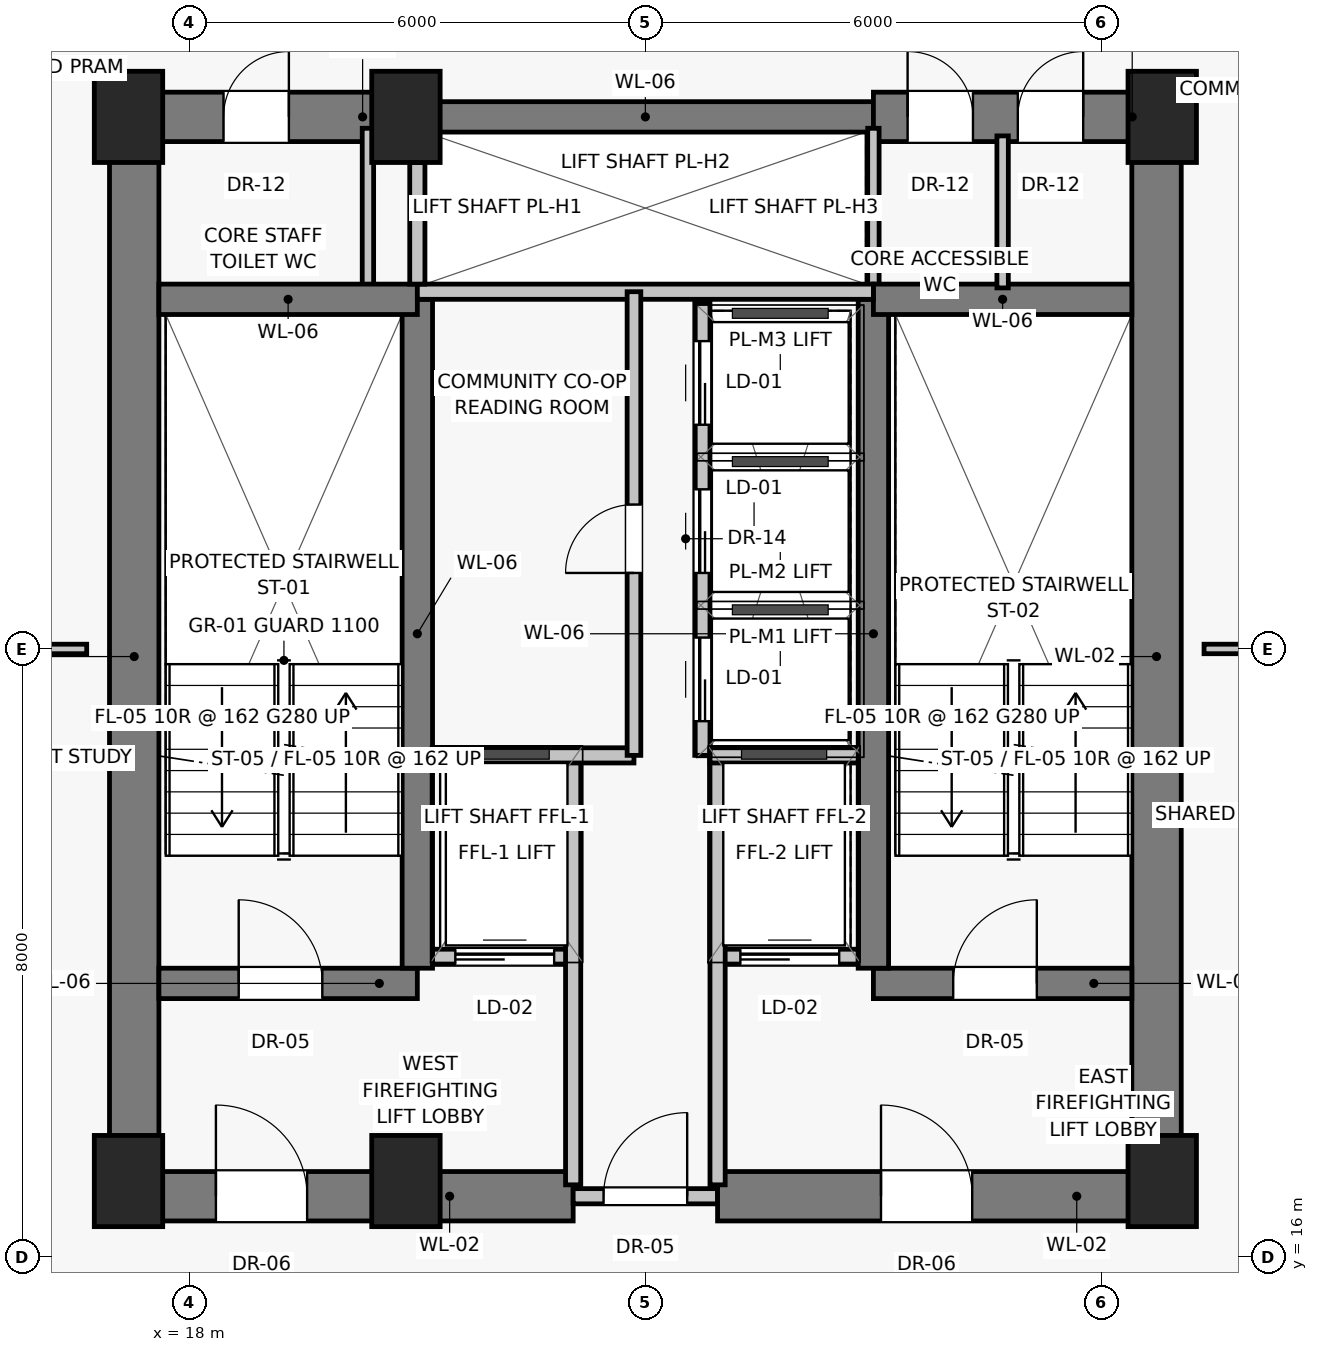
"""IFC4 building model, lengths in metres.
Left out: names, types, materials, properties, quantities, classifications, styles, units other than length and angle.
Written with IfcOpenShell. Run it as: python <this file> out.ifc"""

import sys

from ifc_helpers import new_model, si_unit, direction, frame, frame_2d, origin, origin_2d, place, context, subcontext, project, spatial, rectangle, extrude, source, transform, mapped, element, fill, save


model = new_model("IFC4")
c1 = context("Model", 3, precision=1e-05, world=origin(), true_north=direction((0.0, 1.0)))
c2 = subcontext(c1, "Body", "Model", "MODEL_VIEW")
j1 = project(units=[si_unit("LENGTHUNIT", "METRE"), si_unit("PLANEANGLEUNIT", "RADIAN")], contexts=[c1])
p1 = place(None, origin())
s1 = spatial("IfcSite", under=j1, at=p1, CompositionType="ELEMENT")
p2 = place(p1, origin())
s2 = spatial("IfcBuilding", under=s1, at=p2, CompositionType="ELEMENT")
p3 = place(p2, frame((0.0, 0.0, 149.0)))
s3 = spatial("IfcBuildingStorey", under=s2, at=p3, CompositionType="ELEMENT", Elevation=149.0)
for number, where, z_axis, x_axis in (
    (1, (17.2, 17.0, 0.0), (0.0, 0.0, 1.0), (1.0, 0.0, 0.0)),
    (2, (20.85, 17.0, 0.0), (0.0, 0.0, 1.0), (1.0, 0.0, 0.0)),
    (3, (30.8, 17.0, 0.0), (0.0, 0.0, 1.0), (1.0, 0.0, 0.0)),
    (4, (17.2, 31.0, 0.0), (0.0, 0.0, 1.0), (1.0, 0.0, 0.0)),
    (5, (20.85, 31.0, 0.0), (0.0, 0.0, 1.0), (1.0, 0.0, 0.0)),
    (6, (30.8, 31.0, 0.0), (0.0, 0.0, 1.0), (1.0, 0.0, 0.0)),
):
    element("IfcColumn", number, at=place(p3, frame(where, z_axis=z_axis, x_axis=x_axis)), inside=s3, PredefinedType="PILASTER", context=c2, shape_type="SweptSolid", body=[
        extrude(rectangle(XDim=0.9, YDim=1.2, at=origin_2d()), origin(), (0.0, 0.0, 1.0), 3.25),
    ])
for number, where, z_axis, x_axis in (
    (7, (17.275, 16.8, 0.0), (0.0, 0.0, 1.0), (0.0, 1.0, 0.0)),
    (8, (30.725, 16.8, 0.0), (0.0, 0.0, 1.0), (0.0, 1.0, 0.0)),
):
    element("IfcWall", number, at=place(p3, frame(where, z_axis=z_axis, x_axis=x_axis)), inside=s3, PredefinedType="SHEAR", context=c2, shape_type="SweptSolid", body=[
        extrude(rectangle(XDim=14.2, YDim=0.65, at=frame_2d((7.1, 0.0))), origin(), (0.0, 0.0, 1.0), 3.0),
    ])
p4 = place(p3, frame((17.2, 16.8, 0.0), z_axis=(0.0, 0.0, 1.0), x_axis=(1.0, 0.0, 0.0)))
e9 = element("IfcWall", 9, at=p4, inside=s3, PredefinedType="SHEAR", context=c2, shape_type="SweptSolid", body=[
    extrude(rectangle(XDim=5.85, YDim=0.65, at=frame_2d((2.925, 0.0))), origin(), (0.0, 0.0, 1.0), 3.0),
])
p5 = place(p4, frame((1.15, 0.0, 0.0)))
e10 = element("IfcOpeningElement", 10, at=p5, cuts=e9, PredefinedType="OPENING", context=c2, shape_type="SweptSolid", body=[
    extrude(rectangle(XDim=1.2, YDim=2.03, at=frame_2d((0.6, 1.015))), frame((0.0, 0.335, 0.0), z_axis=(0.0, -1.0, 0.0), x_axis=(1.0, 0.0, 0.0)), (0.0, 0.0, 1.0), 0.67),
])
p6 = place(p3, frame((23.05, 16.8, 0.0), z_axis=(0.0, 0.0, 1.0), x_axis=(1.0, 0.0, 0.0)))
e11 = element("IfcWall", 11, at=p6, inside=s3, PredefinedType="SOLIDWALL", context=c2, shape_type="SweptSolid", body=[
    extrude(rectangle(XDim=1.9, YDim=0.2, at=frame_2d((0.95, 0.0))), origin(), (0.0, 0.0, 1.0), 2.15),
])
p7 = place(p6, frame((0.4, 0.0, 0.0)))
e12 = element("IfcOpeningElement", 12, at=p7, cuts=e11, PredefinedType="OPENING", context=c2, shape_type="SweptSolid", body=[
    extrude(rectangle(XDim=1.1, YDim=2.03, at=frame_2d((0.55, 1.015))), frame((0.0, 0.11, 0.0), z_axis=(0.0, -1.0, 0.0), x_axis=(1.0, 0.0, 0.0)), (0.0, 0.0, 1.0), 0.22),
])
p8 = place(p3, frame((24.95, 16.8, 0.0), z_axis=(0.0, 0.0, 1.0), x_axis=(1.0, 0.0, 0.0)))
e13 = element("IfcWall", 13, at=p8, inside=s3, PredefinedType="SHEAR", context=c2, shape_type="SweptSolid", body=[
    extrude(rectangle(XDim=5.85, YDim=0.65, at=frame_2d((2.925, 0.0))), origin(), (0.0, 0.0, 1.0), 3.0),
])
p9 = place(p8, frame((2.15, 0.0, 0.0)))
e14 = element("IfcOpeningElement", 14, at=p9, cuts=e13, PredefinedType="OPENING", context=c2, shape_type="SweptSolid", body=[
    extrude(rectangle(XDim=1.2, YDim=2.03, at=frame_2d((0.6, 1.015))), frame((0.0, 0.335, 0.0), z_axis=(0.0, -1.0, 0.0), x_axis=(1.0, 0.0, 0.0)), (0.0, 0.0, 1.0), 0.67),
])
p10 = place(p3, frame((17.2, 31.0, 0.0), z_axis=(0.0, 0.0, 1.0), x_axis=(1.0, 0.0, 0.0)))
e15 = element("IfcWall", 15, at=p10, inside=s3, PredefinedType="SHEAR", context=c2, shape_type="SweptSolid", body=[
    extrude(rectangle(XDim=3.8, YDim=0.65, at=frame_2d((1.9, 0.0))), origin(), (0.0, 0.0, 1.0), 3.0),
])
p11 = place(p10, frame((1.25, 0.0, 0.0)))
e16 = element("IfcOpeningElement", 16, at=p11, cuts=e15, PredefinedType="OPENING", context=c2, shape_type="SweptSolid", body=[
    extrude(rectangle(XDim=0.86, YDim=2.01, at=frame_2d((0.43, 1.005))), frame((0.0, 0.335, 0.0), z_axis=(0.0, -1.0, 0.0), x_axis=(1.0, 0.0, 0.0)), (0.0, 0.0, 1.0), 0.67),
])
p12 = place(p3, frame((21.0, 31.0, 0.0), z_axis=(0.0, 0.0, 1.0), x_axis=(1.0, 0.0, 0.0)))
e17 = element("IfcWall", 17, at=p12, inside=s3, PredefinedType="SHEAR", context=c2, shape_type="SweptSolid", body=[
    extrude(rectangle(XDim=6.0, YDim=0.4, at=frame_2d((3.0, 0.0))), origin(), (0.0, 0.0, 1.0), 3.0),
])
p13 = place(p3, frame((27.0, 31.0, 0.0), z_axis=(0.0, 0.0, 1.0), x_axis=(1.0, 0.0, 0.0)))
e18 = element("IfcWall", 18, at=p13, inside=s3, PredefinedType="SHEAR", context=c2, shape_type="SweptSolid", body=[
    extrude(rectangle(XDim=3.8, YDim=0.65, at=frame_2d((1.9, 0.0))), origin(), (0.0, 0.0, 1.0), 3.0),
])
p14 = place(p13, frame((0.45, 0.0, 0.0)))
e19 = element("IfcOpeningElement", 19, at=p14, cuts=e18, PredefinedType="OPENING", context=c2, shape_type="SweptSolid", body=[
    extrude(rectangle(XDim=0.86, YDim=2.01, at=frame_2d((0.43, 1.005))), frame((0.0, 0.335, 0.0), z_axis=(0.0, -1.0, 0.0), x_axis=(1.0, 0.0, 0.0)), (0.0, 0.0, 1.0), 0.67),
])
p15 = place(p13, frame((1.9, 0.0, 0.0)))
e20 = element("IfcOpeningElement", 20, at=p15, cuts=e18, PredefinedType="OPENING", context=c2, shape_type="SweptSolid", body=[
    extrude(rectangle(XDim=0.86, YDim=2.01, at=frame_2d((0.43, 1.005))), frame((0.0, 0.335, 0.0), z_axis=(0.0, -1.0, 0.0), x_axis=(1.0, 0.0, 0.0)), (0.0, 0.0, 1.0), 0.67),
])
for number, where, z_axis, x_axis in (
    (21, (20.35, 28.65, 0.0), (0.0, 0.0, 1.0), (0.0, 1.0, 0.0)),
    (22, (27.0, 28.65, 0.0), (0.0, 0.0, 1.0), (0.0, 1.0, 0.0)),
):
    element("IfcWall", number, at=place(p3, frame(where, z_axis=z_axis, x_axis=x_axis)), inside=s3, PredefinedType="PARTITIONING", context=c2, shape_type="SweptSolid", body=[
        extrude(rectangle(XDim=2.2, YDim=0.15, at=frame_2d((1.1, 0.0))), origin(), (0.0, 0.0, 1.0), 3.0),
    ])
p16 = place(p3, frame((17.6, 19.6, 0.0), z_axis=(0.0, 0.0, 1.0), x_axis=(1.0, 0.0, 0.0)))
e23 = element("IfcWall", 23, at=p16, inside=s3, PredefinedType="SHEAR", context=c2, shape_type="SweptSolid", body=[
    extrude(rectangle(XDim=3.4, YDim=0.4, at=frame_2d((1.7, 0.0))), origin(), (0.0, 0.0, 1.0), 3.0),
])
p17 = place(p16, frame((1.05, 0.0, 0.0)))
e24 = element("IfcOpeningElement", 24, at=p17, cuts=e23, PredefinedType="OPENING", context=c2, shape_type="SweptSolid", body=[
    extrude(rectangle(XDim=1.1, YDim=2.03, at=frame_2d((0.55, 1.015))), frame((0.0, 0.21, 0.0), z_axis=(0.0, -1.0, 0.0), x_axis=(1.0, 0.0, 0.0)), (0.0, 0.0, 1.0), 0.42),
])
p18 = place(p3, frame((21.2, 19.95, 0.0), z_axis=(0.0, 0.0, 1.0), x_axis=(1.0, 0.0, 0.0)))
e25 = element("IfcWall", 25, at=p18, inside=s3, PredefinedType="SOLIDWALL", context=c2, shape_type="SweptSolid", body=[
    extrude(rectangle(XDim=1.85, YDim=0.2, at=frame_2d((0.925, 0.0))), origin(), (0.0, 0.0, 1.0), 3.0),
])
p19 = place(p18, frame((0.3, 0.0, 0.0)))
e26 = element("IfcOpeningElement", 26, at=p19, cuts=e25, PredefinedType="OPENING", context=c2, shape_type="SweptSolid", body=[
    extrude(rectangle(XDim=1.3, YDim=2.25, at=frame_2d((0.65, 1.125))), frame((0.0, 0.11, 0.0), z_axis=(0.0, -1.0, 0.0), x_axis=(1.0, 0.0, 0.0)), (0.0, 0.0, 1.0), 0.22),
])
p20 = place(p3, frame((24.95, 19.95, 0.0), z_axis=(0.0, 0.0, 1.0), x_axis=(1.0, 0.0, 0.0)))
e27 = element("IfcWall", 27, at=p20, inside=s3, PredefinedType="SOLIDWALL", context=c2, shape_type="SweptSolid", body=[
    extrude(rectangle(XDim=1.85, YDim=0.2, at=frame_2d((0.925, 0.0))), origin(), (0.0, 0.0, 1.0), 3.0),
])
p21 = place(p20, frame((0.3, 0.0, 0.0)))
e28 = element("IfcOpeningElement", 28, at=p21, cuts=e27, PredefinedType="OPENING", context=c2, shape_type="SweptSolid", body=[
    extrude(rectangle(XDim=1.3, YDim=2.25, at=frame_2d((0.65, 1.125))), frame((0.0, 0.11, 0.0), z_axis=(0.0, -1.0, 0.0), x_axis=(1.0, 0.0, 0.0)), (0.0, 0.0, 1.0), 0.22),
])
p22 = place(p3, frame((27.0, 19.6, 0.0), z_axis=(0.0, 0.0, 1.0), x_axis=(1.0, 0.0, 0.0)))
e29 = element("IfcWall", 29, at=p22, inside=s3, PredefinedType="SHEAR", context=c2, shape_type="SweptSolid", body=[
    extrude(rectangle(XDim=3.4, YDim=0.4, at=frame_2d((1.7, 0.0))), origin(), (0.0, 0.0, 1.0), 3.0),
])
p23 = place(p22, frame((1.05, 0.0, 0.0)))
e30 = element("IfcOpeningElement", 30, at=p23, cuts=e29, PredefinedType="OPENING", context=c2, shape_type="SweptSolid", body=[
    extrude(rectangle(XDim=1.1, YDim=2.03, at=frame_2d((0.55, 1.015))), frame((0.0, 0.21, 0.0), z_axis=(0.0, -1.0, 0.0), x_axis=(1.0, 0.0, 0.0)), (0.0, 0.0, 1.0), 0.42),
])
for number, where, z_axis, x_axis in (
    (31, (21.0, 19.8, 0.0), (0.0, 0.0, 1.0), (0.0, 1.0, 0.0)),
    (32, (27.0, 19.8, 0.0), (0.0, 0.0, 1.0), (0.0, 1.0, 0.0)),
):
    element("IfcWall", number, at=place(p3, frame(where, z_axis=z_axis, x_axis=x_axis)), inside=s3, PredefinedType="SHEAR", context=c2, shape_type="SweptSolid", body=[
        extrude(rectangle(XDim=8.8, YDim=0.4, at=frame_2d((4.4, 0.0))), origin(), (0.0, 0.0, 1.0), 3.0),
    ])
for number, where, z_axis, x_axis in (
    (33, (17.6, 28.6, 0.0), (0.0, 0.0, 1.0), (1.0, 0.0, 0.0)),
    (34, (27.0, 28.6, 0.0), (0.0, 0.0, 1.0), (1.0, 0.0, 0.0)),
):
    element("IfcWall", number, at=place(p3, frame(where, z_axis=z_axis, x_axis=x_axis)), inside=s3, PredefinedType="SHEAR", context=c2, shape_type="SweptSolid", body=[
        extrude(rectangle(XDim=3.4, YDim=0.4, at=frame_2d((1.7, 0.0))), origin(), (0.0, 0.0, 1.0), 3.0),
    ])
for number, where, z_axis, x_axis in (
    (35, (23.05, 16.95, 0.0), (0.0, 0.0, 1.0), (0.0, 1.0, 0.0)),
    (36, (24.95, 16.95, 0.0), (0.0, 0.0, 1.0), (0.0, 1.0, 0.0)),
):
    element("IfcWall", number, at=place(p3, frame(where, z_axis=z_axis, x_axis=x_axis)), inside=s3, PredefinedType="SOLIDWALL", context=c2, shape_type="SweptSolid", body=[
        extrude(rectangle(XDim=5.6, YDim=0.2, at=frame_2d((2.8, 0.0))), origin(), (0.0, 0.0, 1.0), 3.0),
    ])
p24 = place(p3, frame((21.2, 22.6, 0.0), z_axis=(0.0, 0.0, 1.0), x_axis=(1.0, 0.0, 0.0)))
e37 = element("IfcWall", 37, at=p24, inside=s3, PredefinedType="SOLIDWALL", context=c2, shape_type="SweptSolid", body=[
    extrude(rectangle(XDim=2.65, YDim=0.2, at=frame_2d((1.325, 0.0))), origin(), (0.0, 0.0, 1.0), 3.0),
])
p25 = place(p3, frame((24.85, 22.6, 0.0), z_axis=(0.0, 0.0, 1.0), x_axis=(1.0, 0.0, 0.0)))
e38 = element("IfcWall", 38, at=p25, inside=s3, PredefinedType="SOLIDWALL", context=c2, shape_type="SweptSolid", body=[
    extrude(rectangle(XDim=1.95, YDim=0.2, at=frame_2d((0.975, 0.0))), origin(), (0.0, 0.0, 1.0), 3.0),
])
p26 = place(p3, frame((21.0, 28.7, 0.0), z_axis=(0.0, 0.0, 1.0), x_axis=(1.0, 0.0, 0.0)))
e39 = element("IfcWall", 39, at=p26, inside=s3, PredefinedType="SOLIDWALL", context=c2, shape_type="SweptSolid", body=[
    extrude(rectangle(XDim=6.0, YDim=0.2, at=frame_2d((3.0, 0.0))), origin(), (0.0, 0.0, 1.0), 3.0),
])
p27 = place(p3, frame((21.0, 28.8, 0.0), z_axis=(0.0, 0.0, 1.0), x_axis=(0.0, 1.0, 0.0)))
e40 = element("IfcWall", 40, at=p27, inside=s3, PredefinedType="SOLIDWALL", context=c2, shape_type="SweptSolid", body=[
    extrude(rectangle(XDim=1.6, YDim=0.2, at=frame_2d((0.8, 0.0))), origin(), (0.0, 0.0, 1.0), 3.0),
])
p28 = place(p3, frame((23.85, 22.6, 0.0), z_axis=(0.0, 0.0, 1.0), x_axis=(0.0, 1.0, 0.0)))
e41 = element("IfcWall", 41, at=p28, inside=s3, PredefinedType="PARTITIONING", context=c2, shape_type="SweptSolid", body=[
    extrude(rectangle(XDim=6.1, YDim=0.18, at=frame_2d((3.05, 0.0))), origin(), (0.0, 0.0, 1.0), 3.0),
])
p29 = place(p28, frame((2.4, 0.0, 0.0)))
e42 = element("IfcOpeningElement", 42, at=p29, cuts=e41, PredefinedType="OPENING", context=c2, shape_type="SweptSolid", body=[
    extrude(rectangle(XDim=0.9, YDim=2.01, at=frame_2d((0.45, 1.005))), frame((0.0, 0.1, 0.0), z_axis=(0.0, -1.0, 0.0), x_axis=(1.0, 0.0, 0.0)), (0.0, 0.0, 1.0), 0.2),
])
p30 = place(p3, frame((24.75, 22.6, 0.0), z_axis=(0.0, 0.0, 1.0), x_axis=(0.0, 1.0, 0.0)))
e43 = element("IfcWall", 43, at=p30, inside=s3, PredefinedType="SOLIDWALL", context=c2, shape_type="SweptSolid", body=[
    extrude(rectangle(XDim=5.95, YDim=0.2, at=frame_2d((2.975, 0.0))), origin(), (0.0, 0.0, 1.0), 3.0),
])
p31 = place(p30, frame((0.45, 0.0, 0.0)))
e44 = element("IfcOpeningElement", 44, at=p31, cuts=e43, PredefinedType="OPENING", context=c2, shape_type="SweptSolid", body=[
    extrude(rectangle(XDim=1.1, YDim=2.08, at=frame_2d((0.55, 1.04))), frame((0.0, 0.11, 0.0), z_axis=(0.0, -1.0, 0.0), x_axis=(1.0, 0.0, 0.0)), (0.0, 0.0, 1.0), 0.22),
])
p32 = place(p30, frame((2.4, 0.0, 0.0)))
e45 = element("IfcOpeningElement", 45, at=p32, cuts=e43, PredefinedType="OPENING", context=c2, shape_type="SweptSolid", body=[
    extrude(rectangle(XDim=1.1, YDim=2.08, at=frame_2d((0.55, 1.04))), frame((0.0, 0.11, 0.0), z_axis=(0.0, -1.0, 0.0), x_axis=(1.0, 0.0, 0.0)), (0.0, 0.0, 1.0), 0.22),
])
p33 = place(p30, frame((4.35, 0.0, 0.0)))
e46 = element("IfcOpeningElement", 46, at=p33, cuts=e43, PredefinedType="OPENING", context=c2, shape_type="SweptSolid", body=[
    extrude(rectangle(XDim=1.1, YDim=2.08, at=frame_2d((0.55, 1.04))), frame((0.0, 0.11, 0.0), z_axis=(0.0, -1.0, 0.0), x_axis=(1.0, 0.0, 0.0)), (0.0, 0.0, 1.0), 0.22),
])
p34 = place(p3, frame((28.7, 28.75, 0.0), z_axis=(0.0, 0.0, 1.0), x_axis=(0.0, 1.0, 0.0)))
e47 = element("IfcWall", 47, at=p34, inside=s3, PredefinedType="PARTITIONING", context=c2, shape_type="SweptSolid", body=[
    extrude(rectangle(XDim=2.0, YDim=0.15, at=frame_2d((1.0, 0.0))), origin(), (0.0, 0.0, 1.0), 3.0),
])
for number, where, z_axis, x_axis in (
    (48, (14.55, 24.0, 0.0), (0.0, 0.0, 1.0), (1.0, 0.0, 0.0)),
    (49, (31.35, 24.0, 0.0), (0.0, 0.0, 1.0), (1.0, 0.0, 0.0)),
):
    element("IfcWall", number, at=place(p3, frame(where, z_axis=z_axis, x_axis=x_axis)), inside=s3, PredefinedType="PARTITIONING", context=c2, shape_type="SweptSolid", body=[
        extrude(rectangle(XDim=2.1, YDim=0.125, at=frame_2d((1.05, 0.0))), origin(), (0.0, 0.0, 1.0), 3.0),
    ])
m1 = source(origin(), c2, "Body", "SweptSolid", [
    extrude(rectangle(XDim=1.2, YDim=2.03, at=frame_2d((0.6, 1.015))), frame((0.0, 0.025, 0.0), z_axis=(0.0, -1.0, 0.0), x_axis=(1.0, 0.0, 0.0)), (0.0, 0.0, 1.0), 0.05),
])
p35 = place(p5, origin())
e50 = element("IfcDoor", 50, at=p35, inside=s3, OperationType="SINGLE_SWING_LEFT", PredefinedType="DOOR", context=c2, shape_type="MappedRepresentation", body=[
    mapped(m1, transform((0.0, 0.0, 0.0), scale=1.0)),
])
fill(e10, e50)
m2 = source(origin(), c2, "Body", "SweptSolid", [
    extrude(rectangle(XDim=1.1, YDim=2.03, at=frame_2d((0.55, 1.015))), frame((0.0, 0.025, 0.0), z_axis=(0.0, -1.0, 0.0), x_axis=(1.0, 0.0, 0.0)), (0.0, 0.0, 1.0), 0.05),
])
p36 = place(p7, origin())
e51 = element("IfcDoor", 51, at=p36, inside=s3, OperationType="SINGLE_SWING_RIGHT", PredefinedType="DOOR", context=c2, shape_type="MappedRepresentation", body=[
    mapped(m2, transform((0.0, 0.0, 0.0), scale=1.0)),
])
fill(e12, e51)
p37 = place(p9, origin())
e52 = element("IfcDoor", 52, at=p37, inside=s3, OperationType="SINGLE_SWING_LEFT", PredefinedType="DOOR", context=c2, shape_type="MappedRepresentation", body=[
    mapped(m1, transform((0.0, 0.0, 0.0), scale=1.0)),
])
fill(e14, e52)
m3 = source(origin(), c2, "Body", "SweptSolid", [
    extrude(rectangle(XDim=0.86, YDim=2.01, at=frame_2d((0.43, 1.005))), frame((0.0, 0.025, 0.0), z_axis=(0.0, -1.0, 0.0), x_axis=(1.0, 0.0, 0.0)), (0.0, 0.0, 1.0), 0.05),
])
p38 = place(p11, origin())
e53 = element("IfcDoor", 53, at=p38, inside=s3, OperationType="SINGLE_SWING_RIGHT", PredefinedType="DOOR", context=c2, shape_type="MappedRepresentation", body=[
    mapped(m3, transform((0.0, 0.0, 0.0), scale=1.0)),
])
fill(e16, e53)
p39 = place(p14, origin())
e54 = element("IfcDoor", 54, at=p39, inside=s3, OperationType="SINGLE_SWING_LEFT", PredefinedType="DOOR", context=c2, shape_type="MappedRepresentation", body=[
    mapped(m3, transform((0.0, 0.0, 0.0), scale=1.0)),
])
fill(e19, e54)
p40 = place(p15, origin())
e55 = element("IfcDoor", 55, at=p40, inside=s3, OperationType="SINGLE_SWING_RIGHT", PredefinedType="DOOR", context=c2, shape_type="MappedRepresentation", body=[
    mapped(m3, transform((0.0, 0.0, 0.0), scale=1.0)),
])
fill(e20, e55)
p41 = place(p17, origin())
e56 = element("IfcDoor", 56, at=p41, inside=s3, OperationType="SINGLE_SWING_LEFT", PredefinedType="DOOR", context=c2, shape_type="MappedRepresentation", body=[
    mapped(m2, transform((0.0, 0.0, 0.0), scale=1.0)),
])
fill(e24, e56)
m4 = source(origin(), c2, "Body", "SweptSolid", [
    extrude(rectangle(XDim=1.3, YDim=2.25, at=frame_2d((0.65, 1.125))), frame((0.0, 0.025, 0.0), z_axis=(0.0, -1.0, 0.0), x_axis=(1.0, 0.0, 0.0)), (0.0, 0.0, 1.0), 0.05),
])
p42 = place(p19, origin())
e57 = element("IfcDoor", 57, at=p42, inside=s3, OperationType="SLIDING_TO_LEFT", PredefinedType="DOOR", context=c2, shape_type="MappedRepresentation", body=[
    mapped(m4, transform((0.0, 0.0, 0.0), scale=1.0)),
])
fill(e26, e57)
p43 = place(p21, origin())
e58 = element("IfcDoor", 58, at=p43, inside=s3, OperationType="SLIDING_TO_LEFT", PredefinedType="DOOR", context=c2, shape_type="MappedRepresentation", body=[
    mapped(m4, transform((0.0, 0.0, 0.0), scale=1.0)),
])
fill(e28, e58)
p44 = place(p23, origin())
e59 = element("IfcDoor", 59, at=p44, inside=s3, OperationType="SINGLE_SWING_RIGHT", PredefinedType="DOOR", context=c2, shape_type="MappedRepresentation", body=[
    mapped(m2, transform((0.0, 0.0, 0.0), scale=1.0)),
])
fill(e30, e59)
m5 = source(origin(), c2, "Body", "SweptSolid", [
    extrude(rectangle(XDim=0.9, YDim=2.01, at=frame_2d((0.45, 1.005))), frame((0.0, 0.025, 0.0), z_axis=(0.0, -1.0, 0.0), x_axis=(1.0, 0.0, 0.0)), (0.0, 0.0, 1.0), 0.05),
])
p45 = place(p29, origin())
e60 = element("IfcDoor", 60, at=p45, inside=s3, OperationType="SINGLE_SWING_LEFT", PredefinedType="DOOR", context=c2, shape_type="MappedRepresentation", body=[
    mapped(m5, transform((0.0, 0.0, 0.0), scale=1.0)),
])
fill(e42, e60)
m6 = source(origin(), c2, "Body", "SweptSolid", [
    extrude(rectangle(XDim=1.1, YDim=2.08, at=frame_2d((0.55, 1.04))), frame((0.0, 0.025, 0.0), z_axis=(0.0, -1.0, 0.0), x_axis=(1.0, 0.0, 0.0)), (0.0, 0.0, 1.0), 0.05),
])
p46 = place(p31, origin())
e61 = element("IfcDoor", 61, at=p46, inside=s3, OperationType="SLIDING_TO_LEFT", PredefinedType="DOOR", context=c2, shape_type="MappedRepresentation", body=[
    mapped(m6, transform((0.0, 0.0, 0.0), scale=1.0)),
])
fill(e44, e61)
p47 = place(p32, origin())
e62 = element("IfcDoor", 62, at=p47, inside=s3, OperationType="SLIDING_TO_LEFT", PredefinedType="DOOR", context=c2, shape_type="MappedRepresentation", body=[
    mapped(m6, transform((0.0, 0.0, 0.0), scale=1.0)),
])
fill(e45, e62)
p48 = place(p33, origin())
e63 = element("IfcDoor", 63, at=p48, inside=s3, OperationType="SLIDING_TO_LEFT", PredefinedType="DOOR", context=c2, shape_type="MappedRepresentation", body=[
    mapped(m6, transform((0.0, 0.0, 0.0), scale=1.0)),
])
fill(e46, e63)
save(model, sys.argv[1])
